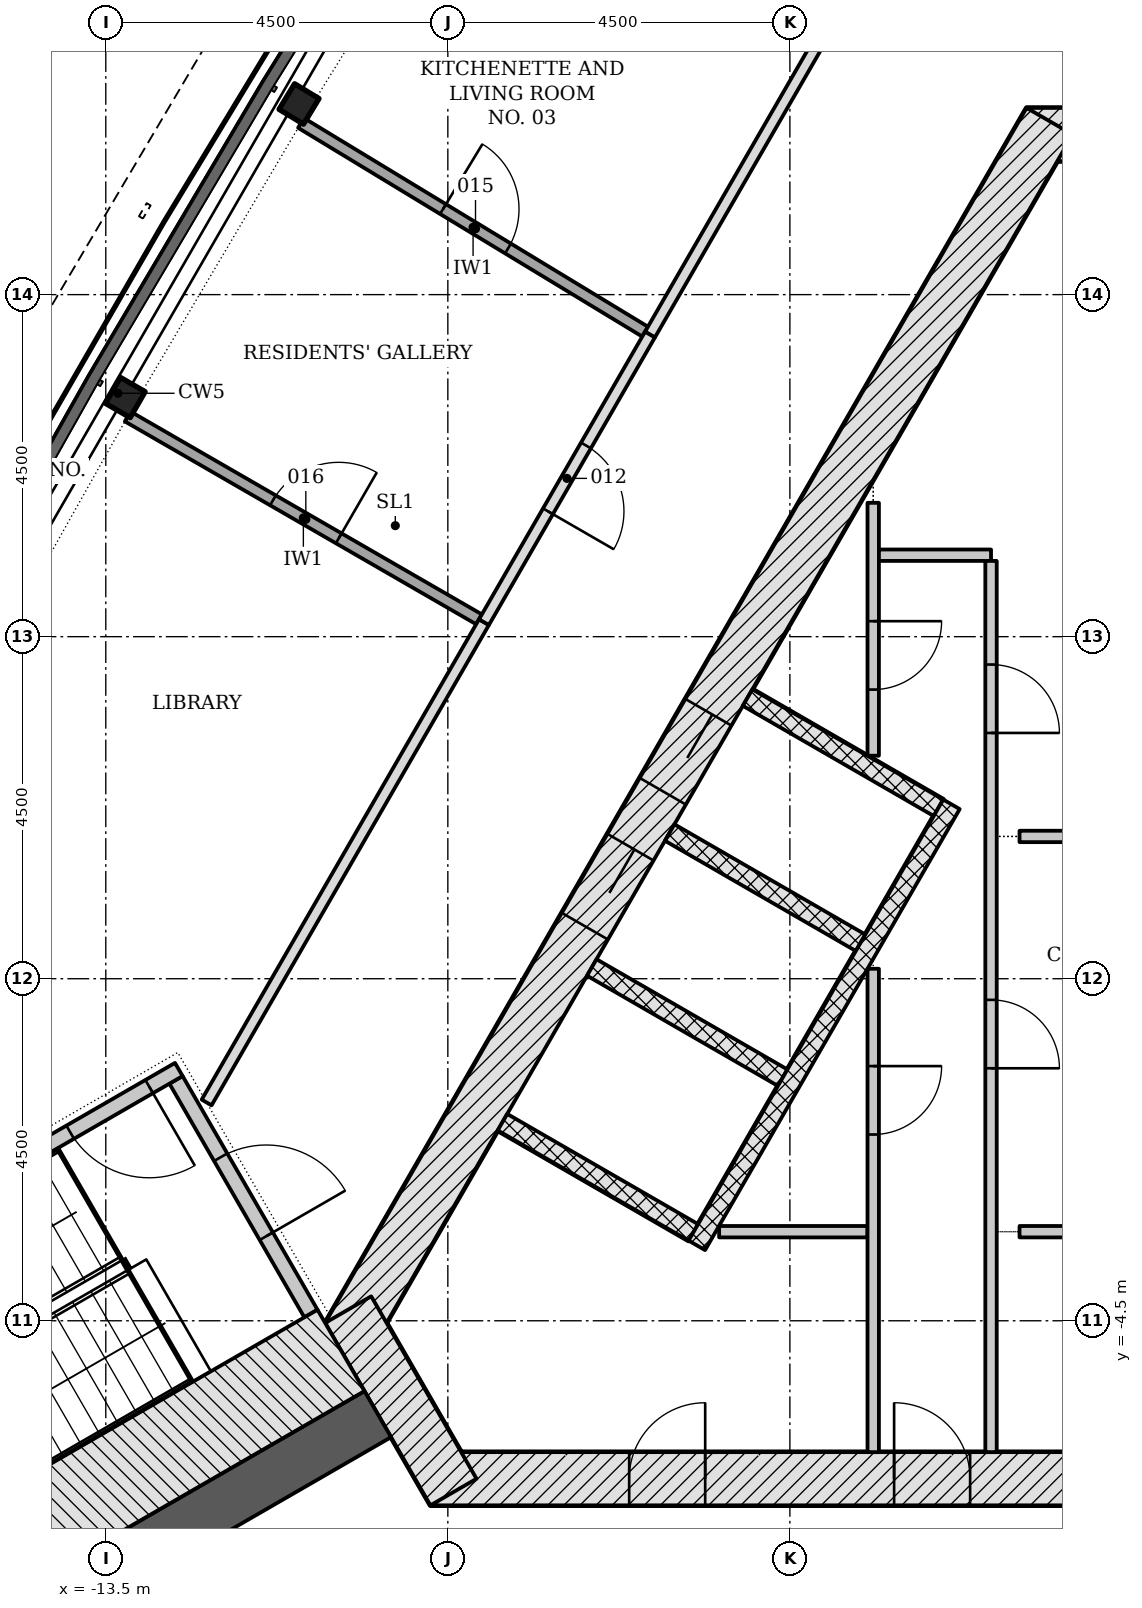
"""IFC4 building model, lengths in metres.
Left out: names, types, materials, properties, quantities, classifications, styles, units other than length and angle.
Written with IfcOpenShell. Run it as: python <this file> out.ifc"""

import sys

from ifc_helpers import new_model, si_unit, direction, frame, frame_2d, origin, origin_2d, place, context, subcontext, project, spatial, polyline, rectangle, i_section, outline, extrude, element, fill, save


model = new_model("IFC4")
c1 = context("Model", 3, precision=1e-05, world=origin(), true_north=direction((0.0, 1.0)))
c2 = subcontext(c1, "Body", "Model", "MODEL_VIEW")
j1 = project(units=[si_unit("LENGTHUNIT", "METRE"), si_unit("PLANEANGLEUNIT", "RADIAN")], contexts=[c1])
p1 = place(None, origin())
s1 = spatial("IfcSite", under=j1, at=p1, CompositionType="ELEMENT")
p2 = place(p1, origin())
s2 = spatial("IfcBuilding", under=s1, at=p2, CompositionType="ELEMENT")
p3 = place(p2, frame((0.0, 0.0, 192.3)))
s3 = spatial("IfcBuildingStorey", under=s2, at=p3, CompositionType="ELEMENT", Elevation=192.3)
p4 = place(p3, frame((-9.229, -6.578, -0.2), z_axis=(0.0, 0.0, 1.0), x_axis=(1.0, 0.0, 0.0)))
e1 = element("IfcWall", 1, at=p4, inside=s3, PredefinedType="SHEAR", context=c2, shape_type="SweptSolid", body=[
    extrude(rectangle(XDim=18.458, YDim=0.7, at=frame_2d((9.229, 0.0))), origin(), (0.0, 0.0, 1.0), 3.6),
])
p5 = place(p4, frame((6.1, 0.0, 0.2)))
e2 = element("IfcOpeningElement", 2, at=p5, cuts=e1, PredefinedType="OPENING", context=c2, shape_type="SweptSolid", body=[
    extrude(rectangle(XDim=1.0, YDim=2.1, at=frame_2d((0.5, 1.05))), frame((0.0, 0.36, 0.0), z_axis=(0.0, -1.0, 0.0), x_axis=(1.0, 0.0, 0.0)), (0.0, 0.0, 1.0), 0.72),
])
p6 = place(p4, frame((2.615, 0.0, 0.2)))
e3 = element("IfcOpeningElement", 3, at=p6, cuts=e1, PredefinedType="OPENING", context=c2, shape_type="SweptSolid", body=[
    extrude(rectangle(XDim=1.0, YDim=2.1, at=frame_2d((0.5, 1.05))), frame((0.0, 0.36, 0.0), z_axis=(0.0, -1.0, 0.0), x_axis=(1.0, 0.0, 0.0)), (0.0, 0.0, 1.0), 0.72),
])
p7 = place(p4, frame((9.198, 0.0, 0.2)))
e4 = element("IfcOpeningElement", 4, at=p7, cuts=e1, PredefinedType="OPENING", context=c2, shape_type="SweptSolid", body=[
    extrude(rectangle(XDim=0.9, YDim=2.1, at=frame_2d((0.45, 1.05))), frame((0.0, 0.36, 0.0), z_axis=(0.0, -1.0, 0.0), x_axis=(1.0, 0.0, 0.0)), (0.0, 0.0, 1.0), 0.72),
])
p8 = place(p4, frame((13.877, 0.0, 0.2)))
e5 = element("IfcOpeningElement", 5, at=p8, cuts=e1, PredefinedType="OPENING", context=c2, shape_type="SweptSolid", body=[
    extrude(rectangle(XDim=0.9, YDim=2.1, at=frame_2d((0.45, 1.05))), frame((0.0, 0.36, 0.0), z_axis=(0.0, -1.0, 0.0), x_axis=(1.0, 0.0, 0.0)), (0.0, 0.0, 1.0), 0.72),
])
p9 = place(p3, frame((1.386, 11.106, -0.2), z_axis=(0.0, 0.0, 1.0), x_axis=(-1.0, 0.0, 0.0)))
e6 = element("IfcWall", 6, at=p9, inside=s3, PredefinedType="SHEAR", context=c2, shape_type="SweptSolid", body=[
    extrude(rectangle(XDim=2.771, YDim=0.7, at=frame_2d((1.386, 0.0))), origin(), (0.0, 0.0, 1.0), 3.6),
])
p10 = place(p3, frame((-1.083, 11.281, -0.2), z_axis=(0.0, 0.0, 1.0), x_axis=(-0.500001446645, -0.866024568562, 0.0)))
e7 = element("IfcWall", 7, at=p10, inside=s3, PredefinedType="SHEAR", context=c2, shape_type="SweptSolid", body=[
    extrude(rectangle(XDim=18.458, YDim=0.7, at=frame_2d((9.229, 0.0))), origin(), (0.0, 0.0, 1.0), 3.6),
])
p11 = place(p10, frame((8.979, 0.0, 0.2)))
e8 = element("IfcOpeningElement", 8, at=p11, cuts=e7, PredefinedType="OPENING", context=c2, shape_type="SweptSolid", body=[
    extrude(rectangle(XDim=1.2, YDim=2.1, at=frame_2d((0.6, 1.05))), frame((0.0, 0.36, 0.0), z_axis=(0.0, -1.0, 0.0), x_axis=(1.0, 0.0, 0.0)), (0.0, 0.0, 1.0), 0.72),
])
p12 = place(p10, frame((11.029, 0.0, 0.2)))
e9 = element("IfcOpeningElement", 9, at=p12, cuts=e7, PredefinedType="OPENING", context=c2, shape_type="SweptSolid", body=[
    extrude(rectangle(XDim=1.2, YDim=2.1, at=frame_2d((0.6, 1.05))), frame((0.0, 0.36, 0.0), z_axis=(0.0, -1.0, 0.0), x_axis=(1.0, 0.0, 0.0)), (0.0, 0.0, 1.0), 0.72),
])
p13 = place(p3, frame((-10.311, -4.353, -0.2), z_axis=(0.0, 0.0, 1.0), x_axis=(0.500042739161, -0.866000726912, 0.0)))
e10 = element("IfcWall", 10, at=p13, inside=s3, PredefinedType="SHEAR", context=c2, shape_type="SweptSolid", body=[
    extrude(rectangle(XDim=2.771, YDim=0.7, at=frame_2d((1.386, 0.0))), origin(), (0.0, 0.0, 1.0), 3.6),
])
p14 = place(p3, frame((-9.922, -5.728, -0.2), z_axis=(0.0, 0.0, 1.0), x_axis=(-0.866026421479, -0.499998237297, 0.0)))
e11 = element("IfcWall", 11, at=p14, inside=s3, PredefinedType="SHEAR", context=c2, shape_type="SweptSolid", body=[
    extrude(rectangle(XDim=9.145, YDim=0.7, at=frame_2d((4.572, 0.0))), origin(), (0.0, 0.0, 1.0), 3.6),
])
for number, where, z_axis, x_axis in (
    (12, (-10.958, 11.508, -0.2), (0.0, 0.0, 1.0), (-0.519, -0.855, 0.0)),
    (13, (-13.243, 7.646, -0.2), (0.0, 0.0, 1.0), (-0.5, -0.866, 0.0)),
):
    element("IfcColumn", number, at=place(p3, frame(where, z_axis=z_axis, x_axis=x_axis)), inside=s3, PredefinedType="COLUMN", context=c2, shape_type="SweptSolid", body=[
        extrude(i_section(OverallWidth=0.394, OverallDepth=0.376, WebThickness=0.017, FlangeThickness=0.028, FilletRadius=0.015, at=origin_2d()), origin(), (0.0, 0.0, 1.0), 3.6),
    ])
p15 = place(p3, origin())
e14 = element("IfcWall", 14, at=p15, inside=s3, PredefinedType="NOTDEFINED", context=c2, shape_type="SweptSolid", body=[
    extrude(outline(polyline([(-20.086, -3.981), (-21.463, -6.824), (-21.91, -8.164), (-22.025, -9.572), (-21.798, -10.966), (-21.245, -12.266), (-20.396, -13.395), (-19.302, -14.288), (-18.025, -14.893), (-16.641, -15.175), (-13.49, -15.404), (-13.469, -15.105), (-16.6, -14.877), (-17.929, -14.606), (-19.14, -14.032), (-20.178, -13.186), (-20.983, -12.115), (-21.508, -10.882), (-21.723, -9.56), (-21.615, -8.224), (-21.184, -6.937), (-19.816, -4.112), (-20.086, -3.981)])), origin(), (0.0, 0.0, 1.0), 3.3),
])
for number, where, z_axis, x_axis in (
    (15, (-5.056, 3.699, -0.2), (0.0, 0.0, 1.0), (0.866, -0.5, 0.0)),
    (16, (-6.081, 1.923, -0.2), (0.0, 0.0, 1.0), (0.866, -0.5, 0.0)),
    (17, (-7.106, 0.148, -0.2), (0.0, 0.0, 1.0), (0.866, -0.5, 0.0)),
    (18, (-8.281, -1.887, -0.2), (0.0, 0.0, 1.0), (0.866, -0.5, 0.0)),
):
    element("IfcWall", number, at=place(p3, frame(where, z_axis=z_axis, x_axis=x_axis)), inside=s3, PredefinedType="PARTITIONING", context=c2, shape_type="SweptSolid", body=[
        extrude(rectangle(XDim=2.9, YDim=0.25, at=frame_2d((1.45, 0.0))), origin(), (0.0, 0.0, 1.0), 3.6),
    ])
p16 = place(p3, frame((-2.374, 2.294, 0.0), z_axis=(0.0, 0.0, 1.0), x_axis=(-0.500003174267, -0.866023571113, 0.0)))
e19 = element("IfcWall", 19, at=p16, inside=s3, PredefinedType="PARTITIONING", context=c2, shape_type="SweptSolid", body=[
    extrude(rectangle(XDim=6.7, YDim=0.25, at=frame_2d((3.35, 0.0))), origin(), (0.0, 0.0, 1.0), 3.4),
])
p17 = place(p3, frame((-5.431, -3.328, 0.0), z_axis=(0.0, 0.0, 1.0), x_axis=(1.0, 0.0, 0.0)))
e20 = element("IfcWall", 20, at=p17, inside=s3, PredefinedType="PARTITIONING", context=c2, shape_type="SweptSolid", body=[
    extrude(rectangle(XDim=1.952, YDim=0.15, at=frame_2d((0.976, 0.0))), origin(), (0.0, 0.0, 1.0), 3.4),
])
p18 = place(p3, frame((-3.404, 0.131, 0.0), z_axis=(0.0, 0.0, 1.0), x_axis=(0.0, -1.0, 0.0)))
e21 = element("IfcWall", 21, at=p18, inside=s3, PredefinedType="PARTITIONING", context=c2, shape_type="SweptSolid", body=[
    extrude(rectangle(XDim=6.359, YDim=0.15, at=frame_2d((3.18, 0.0))), origin(), (0.0, 0.0, 1.0), 3.4),
])
p19 = place(p18, frame((1.281, 0.0, 0.0)))
e22 = element("IfcOpeningElement", 22, at=p19, cuts=e21, PredefinedType="OPENING", context=c2, shape_type="SweptSolid", body=[
    extrude(rectangle(XDim=0.9, YDim=2.1, at=frame_2d((0.45, 1.05))), frame((0.0, 0.085, 0.0), z_axis=(0.0, -1.0, 0.0), x_axis=(1.0, 0.0, 0.0)), (0.0, 0.0, 1.0), 0.17),
])
p20 = place(p3, frame((-3.404, 6.261, 0.0), z_axis=(0.0, 0.0, 1.0), x_axis=(0.0, -1.0, 0.0)))
e23 = element("IfcWall", 23, at=p20, inside=s3, PredefinedType="PARTITIONING", context=c2, shape_type="SweptSolid", body=[
    extrude(rectangle(XDim=3.327, YDim=0.15, at=frame_2d((1.664, 0.0))), origin(), (0.0, 0.0, 1.0), 3.4),
])
p21 = place(p20, frame((1.557, 0.0, 0.0)))
e24 = element("IfcOpeningElement", 24, at=p21, cuts=e23, PredefinedType="OPENING", context=c2, shape_type="SweptSolid", body=[
    extrude(rectangle(XDim=0.9, YDim=2.1, at=frame_2d((0.45, 1.05))), frame((0.0, 0.085, 0.0), z_axis=(0.0, -1.0, 0.0), x_axis=(1.0, 0.0, 0.0)), (0.0, 0.0, 1.0), 0.17),
])
p22 = place(p3, frame((-3.329, 5.572, 0.0), z_axis=(0.0, 0.0, 1.0), x_axis=(1.0, 0.0, 0.0)))
e25 = element("IfcWall", 25, at=p22, inside=s3, PredefinedType="PARTITIONING", context=c2, shape_type="SweptSolid", body=[
    extrude(rectangle(XDim=1.475, YDim=0.15, at=frame_2d((0.737, 0.0))), origin(), (0.0, 0.0, 1.0), 3.4),
])
p23 = place(p3, frame((-1.854, 5.497, 0.0), z_axis=(0.0, 0.0, 1.0), x_axis=(0.0, -1.0, 0.0)))
e26 = element("IfcWall", 26, at=p23, inside=s3, PredefinedType="PARTITIONING", context=c2, shape_type="SweptSolid", body=[
    extrude(rectangle(XDim=11.725, YDim=0.15, at=frame_2d((5.863, 0.0))), origin(), (0.0, 0.0, 1.0), 3.4),
])
p24 = place(p23, frame((5.775, 0.0, 0.0)))
e27 = element("IfcOpeningElement", 27, at=p24, cuts=e26, PredefinedType="OPENING", context=c2, shape_type="SweptSolid", body=[
    extrude(rectangle(XDim=0.9, YDim=2.1, at=frame_2d((0.45, 1.05))), frame((0.0, 0.085, 0.0), z_axis=(0.0, -1.0, 0.0), x_axis=(1.0, 0.0, 0.0)), (0.0, 0.0, 1.0), 0.17),
])
p25 = place(p23, frame((1.364, 0.0, 0.0)))
e28 = element("IfcOpeningElement", 28, at=p25, cuts=e26, PredefinedType="OPENING", context=c2, shape_type="SweptSolid", body=[
    extrude(rectangle(XDim=0.9, YDim=2.1, at=frame_2d((0.45, 1.05))), frame((0.0, 0.085, 0.0), z_axis=(0.0, -1.0, 0.0), x_axis=(1.0, 0.0, 0.0)), (0.0, 0.0, 1.0), 0.17),
])
p26 = place(p3, frame((-1.479, -3.328, 0.0), z_axis=(0.0, 0.0, 1.0), x_axis=(1.0, 0.0, 0.0)))
e29 = element("IfcWall", 29, at=p26, inside=s3, PredefinedType="PARTITIONING", context=c2, shape_type="SweptSolid", body=[
    extrude(rectangle(XDim=10.547, YDim=0.15, at=frame_2d((5.273, 0.0))), origin(), (0.0, 0.0, 1.0), 3.4),
])
p27 = place(p3, frame((-1.479, 1.872, 0.0), z_axis=(0.0, 0.0, 1.0), x_axis=(1.0, 0.0, 0.0)))
e30 = element("IfcWall", 30, at=p27, inside=s3, PredefinedType="PARTITIONING", context=c2, shape_type="SweptSolid", body=[
    extrude(rectangle(XDim=4.369, YDim=0.15, at=frame_2d((2.185, 0.0))), origin(), (0.0, 0.0, 1.0), 3.4),
])
p28 = place(p3, frame((-12.576, -1.331, -0.2), z_axis=(0.0, 0.0, 1.0), x_axis=(0.499970499736, -0.8660424351, 0.0)))
e31 = element("IfcWall", 31, at=p28, inside=s3, PredefinedType="SHEAR", context=c2, shape_type="SweptSolid", body=[
    extrude(rectangle(XDim=3.55, YDim=0.2, at=frame_2d((1.775, 0.0))), origin(), (0.0, 0.0, 1.0), 3.6),
])
p29 = place(p28, frame((1.175, 0.0, 0.2)))
e32 = element("IfcOpeningElement", 32, at=p29, cuts=e31, PredefinedType="OPENING", context=c2, shape_type="SweptSolid", body=[
    extrude(rectangle(XDim=1.2, YDim=2.1, at=frame_2d((0.6, 1.05))), frame((0.0, 0.11, 0.0), z_axis=(0.0, -1.0, 0.0), x_axis=(1.0, 0.0, 0.0)), (0.0, 0.0, 1.0), 0.22),
])
p30 = place(p3, frame((-12.539, -1.194, -0.2), z_axis=(0.0, 0.0, 1.0), x_axis=(-0.866045472092, -0.499965239061, 0.0)))
e33 = element("IfcWall", 33, at=p30, inside=s3, PredefinedType="SHEAR", context=c2, shape_type="SweptSolid", body=[
    extrude(rectangle(XDim=5.6, YDim=0.2, at=frame_2d((2.8, 0.0))), origin(), (0.0, 0.0, 1.0), 3.6),
])
p31 = place(p30, frame((0.45, 0.0, 0.2)))
e34 = element("IfcOpeningElement", 34, at=p31, cuts=e33, PredefinedType="OPENING", context=c2, shape_type="SweptSolid", body=[
    extrude(rectangle(XDim=1.2, YDim=2.1, at=frame_2d((0.6, 1.05))), frame((0.0, 0.11, 0.0), z_axis=(0.0, -1.0, 0.0), x_axis=(1.0, 0.0, 0.0)), (0.0, 0.0, 1.0), 0.22),
])
p32 = place(p3, frame((-10.406, -4.89, -0.2), z_axis=(0.0, 0.0, 1.0), x_axis=(-0.866018442252, -0.500012057535, 0.0)))
e35 = element("IfcWall", 35, at=p32, inside=s3, PredefinedType="SHEAR", context=c2, shape_type="SweptSolid", body=[
    extrude(rectangle(XDim=7.2, YDim=1.236, at=frame_2d((3.6, 0.0))), origin(), (0.0, 0.0, 1.0), 3.6),
])
p33 = place(p3, frame((-0.35, 18.85, 0.0), z_axis=(0.0, 0.0, 1.0), x_axis=(-0.500000553364, -0.866025084299, 0.0)))
e36 = element("IfcWall", 36, at=p33, inside=s3, PredefinedType="PARTITIONING", context=c2, shape_type="SweptSolid", body=[
    extrude(rectangle(XDim=11.981, YDim=0.15, at=frame_2d((5.991, 0.0))), origin(), (0.0, 0.0, 1.0), 2.852),
])
p34 = place(p3, frame((-8.525, 4.691, 0.0), z_axis=(0.0, 0.0, 1.0), x_axis=(-0.499986021771, -0.866033473968, 0.0)))
e37 = element("IfcWall", 37, at=p34, inside=s3, PredefinedType="PARTITIONING", context=c2, shape_type="SweptSolid", body=[
    extrude(rectangle(XDim=7.297, YDim=0.15, at=frame_2d((3.648, 0.0))), origin(), (0.0, 0.0, 1.0), 2.852),
])
p35 = place(p3, frame((-10.931, 11.258, 0.0), z_axis=(0.0, 0.0, 1.0), x_axis=(0.855021240233, -0.51859297985, 0.0)))
e38 = element("IfcWall", 38, at=p35, inside=s3, PredefinedType="PARTITIONING", context=c2, shape_type="SweptSolid", body=[
    extrude(rectangle(XDim=5.294, YDim=0.15, at=frame_2d((2.647, 0.0))), origin(), (0.0, 0.0, 1.0), 3.4),
])
p36 = place(p35, frame((2.184, 0.0, 0.0)))
e39 = element("IfcOpeningElement", 39, at=p36, cuts=e38, PredefinedType="OPENING", context=c2, shape_type="SweptSolid", body=[
    extrude(rectangle(XDim=1.0, YDim=2.1, at=frame_2d((0.5, 1.05))), frame((0.0, 0.085, 0.0), z_axis=(0.0, -1.0, 0.0), x_axis=(1.0, 0.0, 0.0)), (0.0, 0.0, 1.0), 0.17),
])
p37 = place(p3, frame((-13.212, 7.397, 0.0), z_axis=(0.0, 0.0, 1.0), x_axis=(0.866041606145, -0.499971935638, 0.0)))
e40 = element("IfcWall", 40, at=p37, inside=s3, PredefinedType="PARTITIONING", context=c2, shape_type="SweptSolid", body=[
    extrude(rectangle(XDim=5.337, YDim=0.15, at=frame_2d((2.668, 0.0))), origin(), (0.0, 0.0, 1.0), 3.4),
])
p38 = place(p37, frame((2.206, 0.0, 0.0)))
e41 = element("IfcOpeningElement", 41, at=p38, cuts=e40, PredefinedType="OPENING", context=c2, shape_type="SweptSolid", body=[
    extrude(rectangle(XDim=1.0, YDim=2.1, at=frame_2d((0.5, 1.05))), frame((0.0, 0.085, 0.0), z_axis=(0.0, -1.0, 0.0), x_axis=(1.0, 0.0, 0.0)), (0.0, 0.0, 1.0), 0.17),
])
p39 = place(p3, frame((-6.341, 8.474, 0.0), z_axis=(0.0, 0.0, 1.0), x_axis=(-0.49999822179, -0.866026430432, 0.0)))
e42 = element("IfcWall", 42, at=p39, inside=s3, PredefinedType="PARTITIONING", context=c2, shape_type="SweptSolid", body=[
    extrude(rectangle(XDim=4.368, YDim=0.15, at=frame_2d((2.184, 0.0))), origin(), (0.0, 0.0, 1.0), 2.852),
])
p40 = place(p39, frame((1.684, 0.0, 0.0)))
e43 = element("IfcOpeningElement", 43, at=p40, cuts=e42, PredefinedType="OPENING", context=c2, shape_type="SweptSolid", body=[
    extrude(rectangle(XDim=1.0, YDim=2.1, at=frame_2d((0.5, 1.05))), frame((0.0, 0.085, 0.0), z_axis=(0.0, -1.0, 0.0), x_axis=(1.0, 0.0, 0.0)), (0.0, 0.0, 1.0), 0.17),
])
p41 = place(p11, origin())
e44 = element("IfcDoor", 44, at=p41, inside=s3, OperationType="DOUBLE_DOOR_SLIDING", PredefinedType="DOOR", context=c2, shape_type="SweptSolid", body=[
    extrude(rectangle(XDim=1.2, YDim=2.1, at=frame_2d((0.6, 1.05))), frame((0.0, 0.025, 0.0), z_axis=(0.0, -1.0, 0.0), x_axis=(1.0, 0.0, 0.0)), (0.0, 0.0, 1.0), 0.05),
])
fill(e8, e44)
p42 = place(p12, origin())
e45 = element("IfcDoor", 45, at=p42, inside=s3, OperationType="DOUBLE_DOOR_SLIDING", PredefinedType="DOOR", context=c2, shape_type="SweptSolid", body=[
    extrude(rectangle(XDim=1.2, YDim=2.1, at=frame_2d((0.6, 1.05))), frame((0.0, 0.025, 0.0), z_axis=(0.0, -1.0, 0.0), x_axis=(1.0, 0.0, 0.0)), (0.0, 0.0, 1.0), 0.05),
])
fill(e9, e45)
p43 = place(p5, origin())
e46 = element("IfcDoor", 46, at=p43, inside=s3, OperationType="SINGLE_SWING_LEFT", PredefinedType="DOOR", context=c2, shape_type="SweptSolid", body=[
    extrude(rectangle(XDim=1.0, YDim=2.1, at=frame_2d((0.5, 1.05))), frame((0.0, 0.075, 0.0), z_axis=(0.0, -1.0, 0.0), x_axis=(1.0, 0.0, 0.0)), (0.0, 0.0, 1.0), 0.15),
])
fill(e2, e46)
p44 = place(p6, origin())
e47 = element("IfcDoor", 47, at=p44, inside=s3, OperationType="SINGLE_SWING_RIGHT", PredefinedType="DOOR", context=c2, shape_type="SweptSolid", body=[
    extrude(rectangle(XDim=1.0, YDim=2.1, at=frame_2d((0.5, 1.05))), frame((0.0, 0.075, 0.0), z_axis=(0.0, -1.0, 0.0), x_axis=(1.0, 0.0, 0.0)), (0.0, 0.0, 1.0), 0.15),
])
fill(e3, e47)
p45 = place(p19, origin())
e48 = element("IfcDoor", 48, at=p45, inside=s3, OperationType="SINGLE_SWING_LEFT", PredefinedType="DOOR", context=c2, shape_type="SweptSolid", body=[
    extrude(rectangle(XDim=0.9, YDim=2.1, at=frame_2d((0.45, 1.05))), frame((0.0, 0.025, 0.0), z_axis=(0.0, -1.0, 0.0), x_axis=(1.0, 0.0, 0.0)), (0.0, 0.0, 1.0), 0.05),
])
fill(e22, e48)
p46 = place(p24, origin())
e49 = element("IfcDoor", 49, at=p46, inside=s3, OperationType="SINGLE_SWING_RIGHT", PredefinedType="DOOR", context=c2, shape_type="SweptSolid", body=[
    extrude(rectangle(XDim=0.9, YDim=2.1, at=frame_2d((0.45, 1.05))), frame((0.0, 0.025, 0.0), z_axis=(0.0, -1.0, 0.0), x_axis=(1.0, 0.0, 0.0)), (0.0, 0.0, 1.0), 0.05),
])
fill(e27, e49)
p47 = place(p21, origin())
e50 = element("IfcDoor", 50, at=p47, inside=s3, OperationType="SINGLE_SWING_LEFT", PredefinedType="DOOR", context=c2, shape_type="SweptSolid", body=[
    extrude(rectangle(XDim=0.9, YDim=2.1, at=frame_2d((0.45, 1.05))), frame((0.0, 0.025, 0.0), z_axis=(0.0, -1.0, 0.0), x_axis=(1.0, 0.0, 0.0)), (0.0, 0.0, 1.0), 0.05),
])
fill(e24, e50)
p48 = place(p25, origin())
e51 = element("IfcDoor", 51, at=p48, inside=s3, OperationType="SINGLE_SWING_RIGHT", PredefinedType="DOOR", context=c2, shape_type="SweptSolid", body=[
    extrude(rectangle(XDim=0.9, YDim=2.1, at=frame_2d((0.45, 1.05))), frame((0.0, 0.025, 0.0), z_axis=(0.0, -1.0, 0.0), x_axis=(1.0, 0.0, 0.0)), (0.0, 0.0, 1.0), 0.05),
])
fill(e28, e51)
p49 = place(p29, origin())
e52 = element("IfcDoor", 52, at=p49, inside=s3, OperationType="SINGLE_SWING_RIGHT", PredefinedType="DOOR", context=c2, shape_type="SweptSolid", body=[
    extrude(rectangle(XDim=1.2, YDim=2.1, at=frame_2d((0.6, 1.05))), frame((0.0, 0.025, 0.0), z_axis=(0.0, -1.0, 0.0), x_axis=(1.0, 0.0, 0.0)), (0.0, 0.0, 1.0), 0.05),
])
fill(e32, e52)
p50 = place(p31, origin())
e53 = element("IfcDoor", 53, at=p50, inside=s3, OperationType="SINGLE_SWING_LEFT", PredefinedType="DOOR", context=c2, shape_type="SweptSolid", body=[
    extrude(rectangle(XDim=1.2, YDim=2.1, at=frame_2d((0.6, 1.05))), frame((0.0, 0.025, 0.0), z_axis=(0.0, -1.0, 0.0), x_axis=(1.0, 0.0, 0.0)), (0.0, 0.0, 1.0), 0.05),
])
fill(e34, e53)
p51 = place(p40, origin())
e54 = element("IfcDoor", 54, at=p51, inside=s3, OperationType="SINGLE_SWING_RIGHT", PredefinedType="DOOR", context=c2, shape_type="SweptSolid", body=[
    extrude(rectangle(XDim=1.0, YDim=2.1, at=frame_2d((0.5, 1.05))), frame((0.0, 0.025, 0.0), z_axis=(0.0, -1.0, 0.0), x_axis=(1.0, 0.0, 0.0)), (0.0, 0.0, 1.0), 0.05),
])
fill(e43, e54)
p52 = place(p36, origin())
e55 = element("IfcDoor", 55, at=p52, inside=s3, OperationType="SINGLE_SWING_LEFT", PredefinedType="DOOR", context=c2, shape_type="SweptSolid", body=[
    extrude(rectangle(XDim=1.0, YDim=2.1, at=frame_2d((0.5, 1.05))), frame((0.0, 0.025, 0.0), z_axis=(0.0, -1.0, 0.0), x_axis=(1.0, 0.0, 0.0)), (0.0, 0.0, 1.0), 0.05),
])
fill(e39, e55)
p53 = place(p38, origin())
e56 = element("IfcDoor", 56, at=p53, inside=s3, OperationType="SINGLE_SWING_RIGHT", PredefinedType="DOOR", context=c2, shape_type="SweptSolid", body=[
    extrude(rectangle(XDim=1.0, YDim=2.1, at=frame_2d((0.5, 1.05))), frame((0.0, 0.025, 0.0), z_axis=(0.0, -1.0, 0.0), x_axis=(1.0, 0.0, 0.0)), (0.0, 0.0, 1.0), 0.05),
])
fill(e41, e56)
save(model, sys.argv[1])
